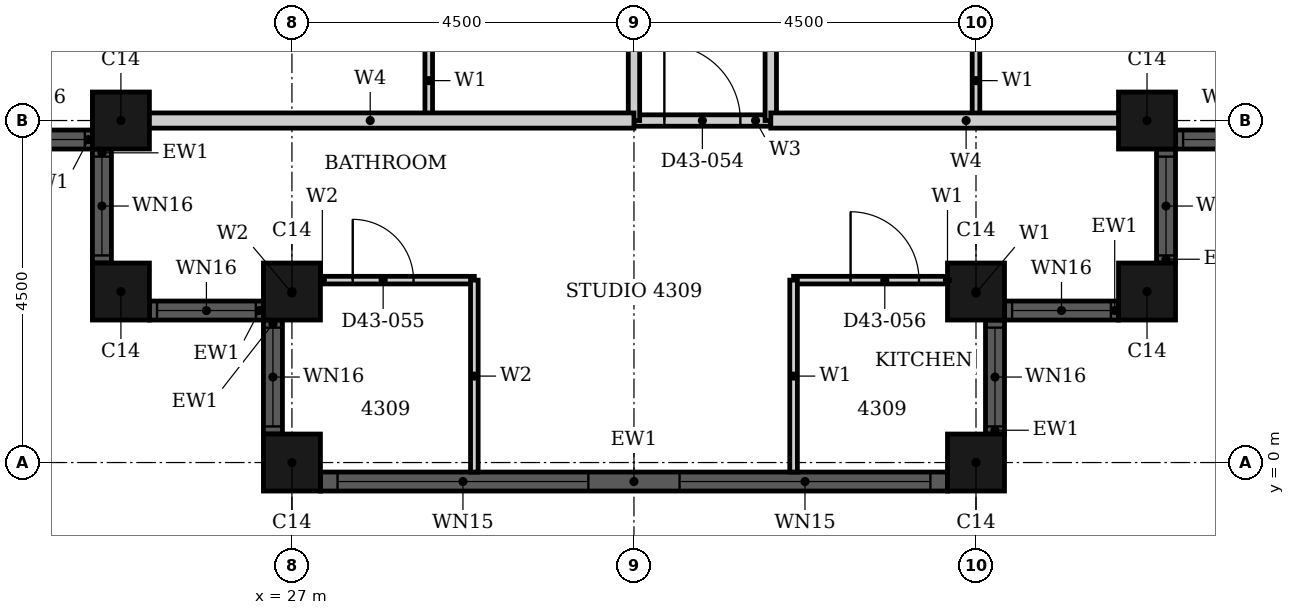
"""IFC4 building model, lengths in metres.
Left out: names, types, materials, properties, quantities, classifications, styles, units other than length and angle.
Written with IfcOpenShell. Run it as: python <this file> out.ifc"""

import sys

from ifc_helpers import new_model, si_unit, direction, frame, frame_2d, origin, origin_2d, place, context, subcontext, project, spatial, rectangle, hollow_rectangle, extrude, element, fill, save


model = new_model("IFC4")
c1 = context("Model", 3, precision=1e-05, world=origin(), true_north=direction((0.0, 1.0)))
c2 = subcontext(c1, "Body", "Model", "MODEL_VIEW")
j1 = project(units=[si_unit("LENGTHUNIT", "METRE"), si_unit("PLANEANGLEUNIT", "RADIAN")], contexts=[c1])
p1 = place(None, origin())
s1 = spatial("IfcSite", under=j1, at=p1, CompositionType="ELEMENT")
p2 = place(p1, origin())
s2 = spatial("IfcBuilding", under=s1, at=p2, CompositionType="ELEMENT")
p3 = place(p2, frame((0.0, 0.0, 172.8)))
s3 = spatial("IfcBuildingStorey", under=s2, at=p3, CompositionType="ELEMENT", Elevation=172.8)
for number, where, z_axis, x_axis in (
    (1, (24.75, 4.5, 0.0), (0.0, 0.0, 1.0), (1.0, 0.0, 0.0)),
    (2, (24.75, 2.25, 0.0), (0.0, 0.0, 1.0), (1.0, 0.0, 0.0)),
    (3, (27.0, 2.25, 0.0), (0.0, 0.0, 1.0), (1.0, 0.0, 0.0)),
    (4, (27.0, 0.0, 0.0), (0.0, 0.0, 1.0), (1.0, 0.0, 0.0)),
    (5, (36.0, 0.0, 0.0), (0.0, 0.0, 1.0), (1.0, 0.0, 0.0)),
    (6, (36.0, 2.25, 0.0), (0.0, 0.0, 1.0), (1.0, 0.0, 0.0)),
    (7, (38.25, 2.25, 0.0), (0.0, 0.0, 1.0), (1.0, 0.0, 0.0)),
    (8, (38.25, 4.5, 0.0), (0.0, 0.0, 1.0), (1.0, 0.0, 0.0)),
):
    element("IfcColumn", number, at=place(p3, frame(where, z_axis=z_axis, x_axis=x_axis)), inside=s3, PredefinedType="COLUMN", context=c2, shape_type="SweptSolid", body=[
        extrude(hollow_rectangle(XDim=0.75, YDim=0.75, WallThickness=0.024, at=origin_2d()), origin(), (0.0, 0.0, 1.0), 3.7),
    ])
p4 = place(p3, frame((22.875, 4.25, 0.0), z_axis=(0.0, 0.0, 1.0), x_axis=(1.0, 0.0, 0.0)))
e9 = element("IfcWall", 9, at=p4, inside=s3, PredefinedType="SOLIDWALL", context=c2, shape_type="SweptSolid", body=[
    extrude(rectangle(XDim=1.5, YDim=0.25, at=frame_2d((0.75, 0.0))), origin(), (0.0, 0.0, 1.0), 3.7),
])
p5 = place(p4, frame((0.1, 0.0, 0.9)))
e10 = element("IfcOpeningElement", 10, at=p5, cuts=e9, PredefinedType="OPENING", context=c2, shape_type="SweptSolid", body=[
    extrude(rectangle(XDim=1.3, YDim=1.85, at=frame_2d((0.65, 0.925))), frame((0.0, 0.135, 0.0), z_axis=(0.0, -1.0, 0.0), x_axis=(1.0, 0.0, 0.0)), (0.0, 0.0, 1.0), 0.27),
])
p6 = place(p3, frame((24.5, 4.125, 0.0), z_axis=(0.0, 0.0, 1.0), x_axis=(0.0, -1.0, 0.0)))
e11 = element("IfcWall", 11, at=p6, inside=s3, PredefinedType="SOLIDWALL", context=c2, shape_type="SweptSolid", body=[
    extrude(rectangle(XDim=1.5, YDim=0.25, at=frame_2d((0.75, 0.0))), origin(), (0.0, 0.0, 1.0), 3.7),
])
p7 = place(p6, frame((0.1, 0.0, 0.9)))
e12 = element("IfcOpeningElement", 12, at=p7, cuts=e11, PredefinedType="OPENING", context=c2, shape_type="SweptSolid", body=[
    extrude(rectangle(XDim=1.3, YDim=1.85, at=frame_2d((0.65, 0.925))), frame((0.0, 0.135, 0.0), z_axis=(0.0, -1.0, 0.0), x_axis=(1.0, 0.0, 0.0)), (0.0, 0.0, 1.0), 0.27),
])
p8 = place(p3, frame((25.125, 2.0, 0.0), z_axis=(0.0, 0.0, 1.0), x_axis=(1.0, 0.0, 0.0)))
e13 = element("IfcWall", 13, at=p8, inside=s3, PredefinedType="SOLIDWALL", context=c2, shape_type="SweptSolid", body=[
    extrude(rectangle(XDim=1.5, YDim=0.25, at=frame_2d((0.75, 0.0))), origin(), (0.0, 0.0, 1.0), 3.7),
])
p9 = place(p8, frame((0.1, 0.0, 0.9)))
e14 = element("IfcOpeningElement", 14, at=p9, cuts=e13, PredefinedType="OPENING", context=c2, shape_type="SweptSolid", body=[
    extrude(rectangle(XDim=1.3, YDim=1.85, at=frame_2d((0.65, 0.925))), frame((0.0, 0.135, 0.0), z_axis=(0.0, -1.0, 0.0), x_axis=(1.0, 0.0, 0.0)), (0.0, 0.0, 1.0), 0.27),
])
p10 = place(p3, frame((26.75, 1.875, 0.0), z_axis=(0.0, 0.0, 1.0), x_axis=(0.0, -1.0, 0.0)))
e15 = element("IfcWall", 15, at=p10, inside=s3, PredefinedType="SOLIDWALL", context=c2, shape_type="SweptSolid", body=[
    extrude(rectangle(XDim=1.5, YDim=0.25, at=frame_2d((0.75, 0.0))), origin(), (0.0, 0.0, 1.0), 3.7),
])
p11 = place(p10, frame((0.1, 0.0, 0.9)))
e16 = element("IfcOpeningElement", 16, at=p11, cuts=e15, PredefinedType="OPENING", context=c2, shape_type="SweptSolid", body=[
    extrude(rectangle(XDim=1.3, YDim=1.85, at=frame_2d((0.65, 0.925))), frame((0.0, 0.135, 0.0), z_axis=(0.0, -1.0, 0.0), x_axis=(1.0, 0.0, 0.0)), (0.0, 0.0, 1.0), 0.27),
])
p12 = place(p3, frame((27.375, -0.25, 0.0), z_axis=(0.0, 0.0, 1.0), x_axis=(1.0, 0.0, 0.0)))
e17 = element("IfcWall", 17, at=p12, inside=s3, PredefinedType="SOLIDWALL", context=c2, shape_type="SweptSolid", body=[
    extrude(rectangle(XDim=8.25, YDim=0.25, at=frame_2d((4.125, 0.0))), origin(), (0.0, 0.0, 1.0), 3.7),
])
p13 = place(p12, frame((0.225, 0.0, 0.45)))
e18 = element("IfcOpeningElement", 18, at=p13, cuts=e17, PredefinedType="OPENING", context=c2, shape_type="SweptSolid", body=[
    extrude(rectangle(XDim=3.3, YDim=2.3, at=frame_2d((1.65, 1.15))), frame((0.0, 0.135, 0.0), z_axis=(0.0, -1.0, 0.0), x_axis=(1.0, 0.0, 0.0)), (0.0, 0.0, 1.0), 0.27),
])
p14 = place(p12, frame((4.725, 0.0, 0.45)))
e19 = element("IfcOpeningElement", 19, at=p14, cuts=e17, PredefinedType="OPENING", context=c2, shape_type="SweptSolid", body=[
    extrude(rectangle(XDim=3.3, YDim=2.3, at=frame_2d((1.65, 1.15))), frame((0.0, 0.135, 0.0), z_axis=(0.0, -1.0, 0.0), x_axis=(1.0, 0.0, 0.0)), (0.0, 0.0, 1.0), 0.27),
])
p15 = place(p3, frame((36.25, 0.375, 0.0), z_axis=(0.0, 0.0, 1.0), x_axis=(0.0, 1.0, 0.0)))
e20 = element("IfcWall", 20, at=p15, inside=s3, PredefinedType="SOLIDWALL", context=c2, shape_type="SweptSolid", body=[
    extrude(rectangle(XDim=1.5, YDim=0.25, at=frame_2d((0.75, 0.0))), origin(), (0.0, 0.0, 1.0), 3.7),
])
p16 = place(p15, frame((0.1, 0.0, 0.9)))
e21 = element("IfcOpeningElement", 21, at=p16, cuts=e20, PredefinedType="OPENING", context=c2, shape_type="SweptSolid", body=[
    extrude(rectangle(XDim=1.3, YDim=1.85, at=frame_2d((0.65, 0.925))), frame((0.0, 0.135, 0.0), z_axis=(0.0, -1.0, 0.0), x_axis=(1.0, 0.0, 0.0)), (0.0, 0.0, 1.0), 0.27),
])
p17 = place(p3, frame((36.375, 2.0, 0.0), z_axis=(0.0, 0.0, 1.0), x_axis=(1.0, 0.0, 0.0)))
e22 = element("IfcWall", 22, at=p17, inside=s3, PredefinedType="SOLIDWALL", context=c2, shape_type="SweptSolid", body=[
    extrude(rectangle(XDim=1.5, YDim=0.25, at=frame_2d((0.75, 0.0))), origin(), (0.0, 0.0, 1.0), 3.7),
])
p18 = place(p17, frame((0.1, 0.0, 0.9)))
e23 = element("IfcOpeningElement", 23, at=p18, cuts=e22, PredefinedType="OPENING", context=c2, shape_type="SweptSolid", body=[
    extrude(rectangle(XDim=1.3, YDim=1.85, at=frame_2d((0.65, 0.925))), frame((0.0, 0.135, 0.0), z_axis=(0.0, -1.0, 0.0), x_axis=(1.0, 0.0, 0.0)), (0.0, 0.0, 1.0), 0.27),
])
p19 = place(p3, frame((38.5, 2.625, 0.0), z_axis=(0.0, 0.0, 1.0), x_axis=(0.0, 1.0, 0.0)))
e24 = element("IfcWall", 24, at=p19, inside=s3, PredefinedType="SOLIDWALL", context=c2, shape_type="SweptSolid", body=[
    extrude(rectangle(XDim=1.5, YDim=0.25, at=frame_2d((0.75, 0.0))), origin(), (0.0, 0.0, 1.0), 3.7),
])
p20 = place(p19, frame((0.1, 0.0, 0.9)))
e25 = element("IfcOpeningElement", 25, at=p20, cuts=e24, PredefinedType="OPENING", context=c2, shape_type="SweptSolid", body=[
    extrude(rectangle(XDim=1.3, YDim=1.85, at=frame_2d((0.65, 0.925))), frame((0.0, 0.135, 0.0), z_axis=(0.0, -1.0, 0.0), x_axis=(1.0, 0.0, 0.0)), (0.0, 0.0, 1.0), 0.27),
])
p21 = place(p3, frame((38.625, 4.25, 0.0), z_axis=(0.0, 0.0, 1.0), x_axis=(1.0, 0.0, 0.0)))
e26 = element("IfcWall", 26, at=p21, inside=s3, PredefinedType="SOLIDWALL", context=c2, shape_type="SweptSolid", body=[
    extrude(rectangle(XDim=1.5, YDim=0.25, at=frame_2d((0.75, 0.0))), origin(), (0.0, 0.0, 1.0), 3.7),
])
p22 = place(p21, frame((0.1, 0.0, 0.9)))
e27 = element("IfcOpeningElement", 27, at=p22, cuts=e26, PredefinedType="OPENING", context=c2, shape_type="SweptSolid", body=[
    extrude(rectangle(XDim=1.3, YDim=1.85, at=frame_2d((0.65, 0.925))), frame((0.0, 0.135, 0.0), z_axis=(0.0, -1.0, 0.0), x_axis=(1.0, 0.0, 0.0)), (0.0, 0.0, 1.0), 0.27),
])
p23 = place(p3, frame((31.5, 4.5, 0.0), z_axis=(0.0, 0.0, 1.0), x_axis=(1.0, 0.0, 0.0)))
e28 = element("IfcWall", 28, at=p23, inside=s3, PredefinedType="PARTITIONING", context=c2, shape_type="SweptSolid", body=[
    extrude(rectangle(XDim=1.8, YDim=0.15, at=frame_2d((0.9, 0.0))), origin(), (0.0, 0.0, 1.0), 3.4),
])
p24 = place(p23, frame((0.4, 0.0, 0.0)))
e29 = element("IfcOpeningElement", 29, at=p24, cuts=e28, PredefinedType="OPENING", context=c2, shape_type="SweptSolid", body=[
    extrude(rectangle(XDim=1.0, YDim=2.2, at=frame_2d((0.5, 1.1))), frame((0.0, 0.085, 0.0), z_axis=(0.0, -1.0, 0.0), x_axis=(1.0, 0.0, 0.0)), (0.0, 0.0, 1.0), 0.17),
])
p25 = place(p3, frame((31.5, 4.5, 0.0), z_axis=(0.0, 0.0, 1.0), x_axis=(0.0, 1.0, 0.0)))
e30 = element("IfcWall", 30, at=p25, inside=s3, PredefinedType="PARTITIONING", context=c2, shape_type="SweptSolid", body=[
    extrude(rectangle(XDim=6.6, YDim=0.15, at=frame_2d((3.3, 0.0))), origin(), (0.0, 0.0, 1.0), 2.68),
])
p26 = place(p25, frame((4.3, 0.0, 0.0)))
e31 = element("IfcOpeningElement", 31, at=p26, cuts=e30, PredefinedType="OPENING", context=c2, shape_type="SweptSolid", body=[
    extrude(rectangle(XDim=1.0, YDim=2.2, at=frame_2d((0.5, 1.1))), frame((0.0, 0.085, 0.0), z_axis=(0.0, -1.0, 0.0), x_axis=(1.0, 0.0, 0.0)), (0.0, 0.0, 1.0), 0.17),
])
p27 = place(p3, frame((33.3, 4.5, 0.0), z_axis=(0.0, 0.0, 1.0), x_axis=(0.0, 1.0, 0.0)))
e32 = element("IfcWall", 32, at=p27, inside=s3, PredefinedType="PARTITIONING", context=c2, shape_type="SweptSolid", body=[
    extrude(rectangle(XDim=6.6, YDim=0.15, at=frame_2d((3.3, 0.0))), origin(), (0.0, 0.0, 1.0), 3.4),
])
p28 = place(p27, frame((4.3, 0.0, 0.0)))
e33 = element("IfcOpeningElement", 33, at=p28, cuts=e32, PredefinedType="OPENING", context=c2, shape_type="SweptSolid", body=[
    extrude(rectangle(XDim=1.0, YDim=2.2, at=frame_2d((0.5, 1.1))), frame((0.0, 0.085, 0.0), z_axis=(0.0, -1.0, 0.0), x_axis=(1.0, 0.0, 0.0)), (0.0, 0.0, 1.0), 0.17),
])
p29 = place(p3, frame((33.6, 2.4, 0.0), z_axis=(0.0, 0.0, 1.0), x_axis=(1.0, 0.0, 0.0)))
e34 = element("IfcWall", 34, at=p29, inside=s3, PredefinedType="PARTITIONING", context=c2, shape_type="SweptSolid", body=[
    extrude(rectangle(XDim=2.4, YDim=0.1, at=frame_2d((1.2, 0.0))), origin(), (0.0, 0.0, 1.0), 3.4),
])
p30 = place(p29, frame((0.75, 0.0, 0.0)))
e35 = element("IfcOpeningElement", 35, at=p30, cuts=e34, PredefinedType="OPENING", context=c2, shape_type="SweptSolid", body=[
    extrude(rectangle(XDim=0.9, YDim=2.1, at=frame_2d((0.45, 1.05))), frame((0.0, 0.06, 0.0), z_axis=(0.0, -1.0, 0.0), x_axis=(1.0, 0.0, 0.0)), (0.0, 0.0, 1.0), 0.12),
])
p31 = place(p3, frame((28.8, 4.5, 0.0), z_axis=(0.0, 0.0, 1.0), x_axis=(0.0, 1.0, 0.0)))
e36 = element("IfcWall", 36, at=p31, inside=s3, PredefinedType="PARTITIONING", context=c2, shape_type="SweptSolid", body=[
    extrude(rectangle(XDim=3.0, YDim=0.1, at=frame_2d((1.5, 0.0))), origin(), (0.0, 0.0, 1.0), 3.4),
])
p32 = place(p31, frame((1.05, 0.0, 0.0)))
e37 = element("IfcOpeningElement", 37, at=p32, cuts=e36, PredefinedType="OPENING", context=c2, shape_type="SweptSolid", body=[
    extrude(rectangle(XDim=0.9, YDim=2.1, at=frame_2d((0.45, 1.05))), frame((0.0, 0.06, 0.0), z_axis=(0.0, -1.0, 0.0), x_axis=(1.0, 0.0, 0.0)), (0.0, 0.0, 1.0), 0.12),
])
p33 = place(p3, frame((33.6, -0.125, 0.0), z_axis=(0.0, 0.0, 1.0), x_axis=(0.0, 1.0, 0.0)))
e38 = element("IfcWall", 38, at=p33, inside=s3, PredefinedType="PARTITIONING", context=c2, shape_type="SweptSolid", body=[
    extrude(rectangle(XDim=2.525, YDim=0.1, at=frame_2d((1.262, 0.0))), origin(), (0.0, 0.0, 1.0), 3.4),
])
p34 = place(p3, frame((36.0, 4.5, 0.0), z_axis=(0.0, 0.0, 1.0), x_axis=(0.0, 1.0, 0.0)))
e39 = element("IfcWall", 39, at=p34, inside=s3, PredefinedType="PARTITIONING", context=c2, shape_type="SweptSolid", body=[
    extrude(rectangle(XDim=3.0, YDim=0.1, at=frame_2d((1.5, 0.0))), origin(), (0.0, 0.0, 1.0), 2.68),
])
p35 = place(p34, frame((1.05, 0.0, 0.0)))
e40 = element("IfcOpeningElement", 40, at=p35, cuts=e39, PredefinedType="OPENING", context=c2, shape_type="SweptSolid", body=[
    extrude(rectangle(XDim=0.9, YDim=2.1, at=frame_2d((0.45, 1.05))), frame((0.0, 0.06, 0.0), z_axis=(0.0, -1.0, 0.0), x_axis=(1.0, 0.0, 0.0)), (0.0, 0.0, 1.0), 0.12),
])
p36 = place(p3, frame((36.0, 2.06, 0.0), z_axis=(0.0, 0.0, 1.0), x_axis=(0.0, 1.0, 0.0)))
e41 = element("IfcWall", 41, at=p36, inside=s3, PredefinedType="PARTITIONING", context=c2, shape_type="SweptSolid", body=[
    extrude(rectangle(XDim=0.34, YDim=0.1, at=frame_2d((0.17, 0.0))), origin(), (0.0, 0.0, 1.0), 3.4),
])
p37 = place(p3, frame((33.3, 4.5, 0.0), z_axis=(0.0, 0.0, 1.0), x_axis=(1.0, 0.0, 0.0)))
e42 = element("IfcWall", 42, at=p37, inside=s3, PredefinedType="PARTITIONING", context=c2, shape_type="SweptSolid", body=[
    extrude(rectangle(XDim=5.14, YDim=0.2, at=frame_2d((2.57, 0.0))), origin(), (0.0, 0.0, 1.0), 3.4),
])
p38 = place(p3, frame((24.56, 4.5, 0.0), z_axis=(0.0, 0.0, 1.0), x_axis=(1.0, 0.0, 0.0)))
e43 = element("IfcWall", 43, at=p38, inside=s3, PredefinedType="PARTITIONING", context=c2, shape_type="SweptSolid", body=[
    extrude(rectangle(XDim=6.94, YDim=0.2, at=frame_2d((3.47, 0.0))), origin(), (0.0, 0.0, 1.0), 3.4),
])
p39 = place(p3, frame((27.0, 2.4, 0.0), z_axis=(0.0, 0.0, 1.0), x_axis=(1.0, 0.0, 0.0)))
e44 = element("IfcWall", 44, at=p39, inside=s3, PredefinedType="PARTITIONING", context=c2, shape_type="SweptSolid", body=[
    extrude(rectangle(XDim=2.4, YDim=0.1, at=frame_2d((1.2, 0.0))), origin(), (0.0, 0.0, 1.0), 3.4),
])
p40 = place(p39, frame((0.8, 0.0, 0.0)))
e45 = element("IfcOpeningElement", 45, at=p40, cuts=e44, PredefinedType="OPENING", context=c2, shape_type="SweptSolid", body=[
    extrude(rectangle(XDim=0.8, YDim=2.1, at=frame_2d((0.4, 1.05))), frame((0.0, 0.06, 0.0), z_axis=(0.0, -1.0, 0.0), x_axis=(1.0, 0.0, 0.0)), (0.0, 0.0, 1.0), 0.12),
])
p41 = place(p3, frame((27.0, 2.06, 0.0), z_axis=(0.0, 0.0, 1.0), x_axis=(0.0, 1.0, 0.0)))
e46 = element("IfcWall", 46, at=p41, inside=s3, PredefinedType="PARTITIONING", context=c2, shape_type="SweptSolid", body=[
    extrude(rectangle(XDim=0.34, YDim=0.1, at=frame_2d((0.17, 0.0))), origin(), (0.0, 0.0, 1.0), 3.4),
])
p42 = place(p3, frame((29.4, -0.125, 0.0), z_axis=(0.0, 0.0, 1.0), x_axis=(0.0, 1.0, 0.0)))
e47 = element("IfcWall", 47, at=p42, inside=s3, PredefinedType="PARTITIONING", context=c2, shape_type="SweptSolid", body=[
    extrude(rectangle(XDim=2.525, YDim=0.1, at=frame_2d((1.262, 0.0))), origin(), (0.0, 0.0, 1.0), 3.4),
])
p43 = place(p5, origin())
e48 = element("IfcWindow", 48, at=p43, inside=s3, PartitioningType="SINGLE_PANEL", PredefinedType="WINDOW", context=c2, shape_type="SweptSolid", body=[
    extrude(rectangle(XDim=1.3, YDim=1.85, at=frame_2d((0.65, 0.925))), frame((0.0, 0.03, 0.0), z_axis=(0.0, -1.0, 0.0), x_axis=(1.0, 0.0, 0.0)), (0.0, 0.0, 1.0), 0.06),
])
fill(e10, e48)
p44 = place(p7, origin())
e49 = element("IfcWindow", 49, at=p44, inside=s3, PartitioningType="SINGLE_PANEL", PredefinedType="WINDOW", context=c2, shape_type="SweptSolid", body=[
    extrude(rectangle(XDim=1.3, YDim=1.85, at=frame_2d((0.65, 0.925))), frame((0.0, 0.03, 0.0), z_axis=(0.0, -1.0, 0.0), x_axis=(1.0, 0.0, 0.0)), (0.0, 0.0, 1.0), 0.06),
])
fill(e12, e49)
p45 = place(p9, origin())
e50 = element("IfcWindow", 50, at=p45, inside=s3, PartitioningType="SINGLE_PANEL", PredefinedType="WINDOW", context=c2, shape_type="SweptSolid", body=[
    extrude(rectangle(XDim=1.3, YDim=1.85, at=frame_2d((0.65, 0.925))), frame((0.0, 0.03, 0.0), z_axis=(0.0, -1.0, 0.0), x_axis=(1.0, 0.0, 0.0)), (0.0, 0.0, 1.0), 0.06),
])
fill(e14, e50)
p46 = place(p11, origin())
e51 = element("IfcWindow", 51, at=p46, inside=s3, PartitioningType="SINGLE_PANEL", PredefinedType="WINDOW", context=c2, shape_type="SweptSolid", body=[
    extrude(rectangle(XDim=1.3, YDim=1.85, at=frame_2d((0.65, 0.925))), frame((0.0, 0.03, 0.0), z_axis=(0.0, -1.0, 0.0), x_axis=(1.0, 0.0, 0.0)), (0.0, 0.0, 1.0), 0.06),
])
fill(e16, e51)
p47 = place(p13, origin())
e52 = element("IfcWindow", 52, at=p47, inside=s3, PartitioningType="SINGLE_PANEL", PredefinedType="WINDOW", context=c2, shape_type="SweptSolid", body=[
    extrude(rectangle(XDim=3.3, YDim=2.3, at=frame_2d((1.65, 1.15))), frame((0.0, 0.03, 0.0), z_axis=(0.0, -1.0, 0.0), x_axis=(1.0, 0.0, 0.0)), (0.0, 0.0, 1.0), 0.06),
])
fill(e18, e52)
p48 = place(p14, origin())
e53 = element("IfcWindow", 53, at=p48, inside=s3, PartitioningType="SINGLE_PANEL", PredefinedType="WINDOW", context=c2, shape_type="SweptSolid", body=[
    extrude(rectangle(XDim=3.3, YDim=2.3, at=frame_2d((1.65, 1.15))), frame((0.0, 0.03, 0.0), z_axis=(0.0, -1.0, 0.0), x_axis=(1.0, 0.0, 0.0)), (0.0, 0.0, 1.0), 0.06),
])
fill(e19, e53)
p49 = place(p16, origin())
e54 = element("IfcWindow", 54, at=p49, inside=s3, PartitioningType="SINGLE_PANEL", PredefinedType="WINDOW", context=c2, shape_type="SweptSolid", body=[
    extrude(rectangle(XDim=1.3, YDim=1.85, at=frame_2d((0.65, 0.925))), frame((0.0, 0.03, 0.0), z_axis=(0.0, -1.0, 0.0), x_axis=(1.0, 0.0, 0.0)), (0.0, 0.0, 1.0), 0.06),
])
fill(e21, e54)
p50 = place(p18, origin())
e55 = element("IfcWindow", 55, at=p50, inside=s3, PartitioningType="SINGLE_PANEL", PredefinedType="WINDOW", context=c2, shape_type="SweptSolid", body=[
    extrude(rectangle(XDim=1.3, YDim=1.85, at=frame_2d((0.65, 0.925))), frame((0.0, 0.03, 0.0), z_axis=(0.0, -1.0, 0.0), x_axis=(1.0, 0.0, 0.0)), (0.0, 0.0, 1.0), 0.06),
])
fill(e23, e55)
p51 = place(p20, origin())
e56 = element("IfcWindow", 56, at=p51, inside=s3, PartitioningType="SINGLE_PANEL", PredefinedType="WINDOW", context=c2, shape_type="SweptSolid", body=[
    extrude(rectangle(XDim=1.3, YDim=1.85, at=frame_2d((0.65, 0.925))), frame((0.0, 0.03, 0.0), z_axis=(0.0, -1.0, 0.0), x_axis=(1.0, 0.0, 0.0)), (0.0, 0.0, 1.0), 0.06),
])
fill(e25, e56)
p52 = place(p22, origin())
e57 = element("IfcWindow", 57, at=p52, inside=s3, PartitioningType="SINGLE_PANEL", PredefinedType="WINDOW", context=c2, shape_type="SweptSolid", body=[
    extrude(rectangle(XDim=1.3, YDim=1.85, at=frame_2d((0.65, 0.925))), frame((0.0, 0.03, 0.0), z_axis=(0.0, -1.0, 0.0), x_axis=(1.0, 0.0, 0.0)), (0.0, 0.0, 1.0), 0.06),
])
fill(e27, e57)
p53 = place(p24, origin())
e58 = element("IfcDoor", 58, at=p53, inside=s3, OperationType="SINGLE_SWING_LEFT", PredefinedType="DOOR", context=c2, shape_type="SweptSolid", body=[
    extrude(rectangle(XDim=1.0, YDim=2.2, at=frame_2d((0.5, 1.1))), frame((0.0, 0.025, 0.0), z_axis=(0.0, -1.0, 0.0), x_axis=(1.0, 0.0, 0.0)), (0.0, 0.0, 1.0), 0.05),
])
fill(e29, e58)
p54 = place(p40, origin())
e59 = element("IfcDoor", 59, at=p54, inside=s3, OperationType="SINGLE_SWING_RIGHT", PredefinedType="DOOR", context=c2, shape_type="SweptSolid", body=[
    extrude(rectangle(XDim=0.8, YDim=2.1, at=frame_2d((0.4, 1.05))), frame((0.0, 0.025, 0.0), z_axis=(0.0, -1.0, 0.0), x_axis=(1.0, 0.0, 0.0)), (0.0, 0.0, 1.0), 0.05),
])
fill(e45, e59)
p55 = place(p30, origin())
e60 = element("IfcDoor", 60, at=p55, inside=s3, OperationType="SINGLE_SWING_LEFT", PredefinedType="DOOR", context=c2, shape_type="SweptSolid", body=[
    extrude(rectangle(XDim=0.9, YDim=2.1, at=frame_2d((0.45, 1.05))), frame((0.0, 0.025, 0.0), z_axis=(0.0, -1.0, 0.0), x_axis=(1.0, 0.0, 0.0)), (0.0, 0.0, 1.0), 0.05),
])
fill(e35, e60)
save(model, sys.argv[1])
